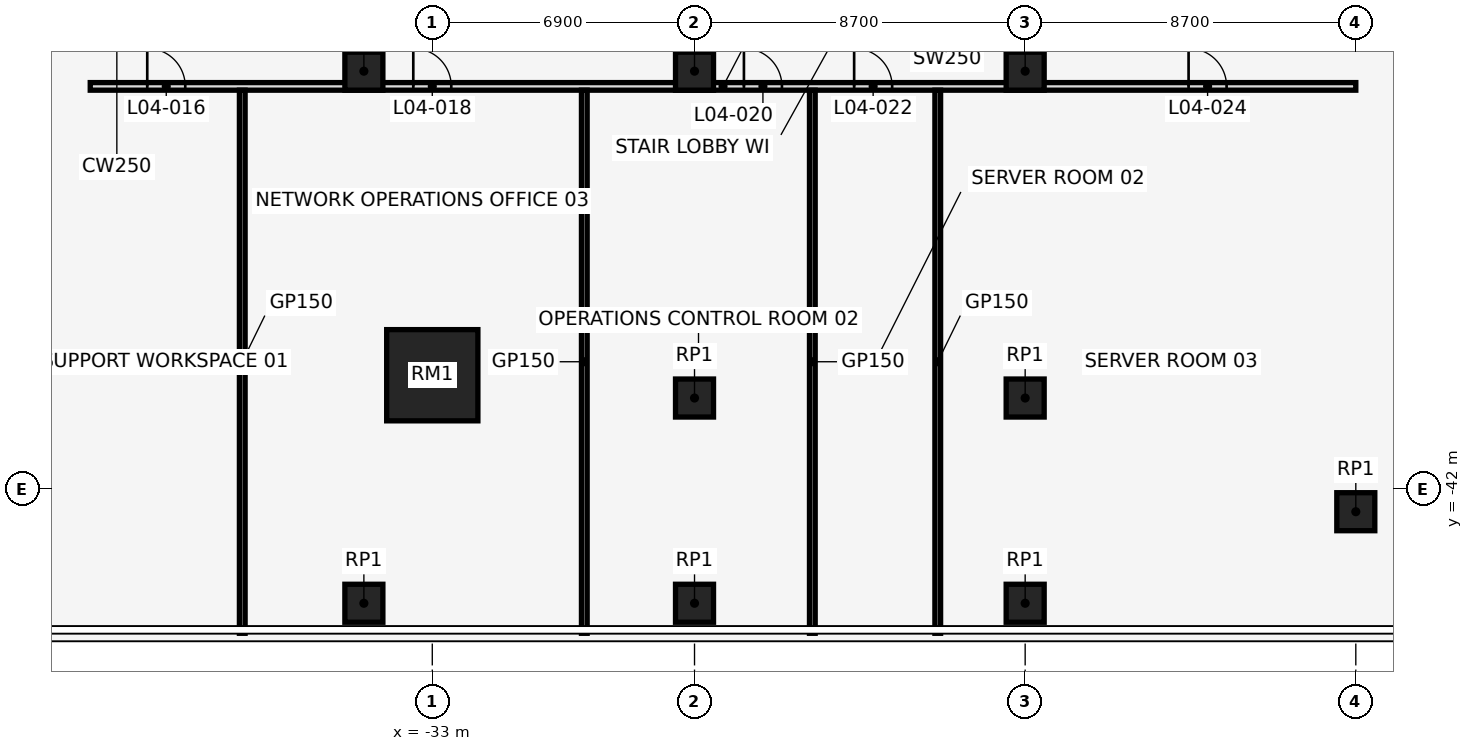
"""IFC4 building model, lengths in metres.
Left out: names, types, materials, properties, quantities, classifications, styles, units other than length and angle.
Written with IfcOpenShell. Run it as: python <this file> out.ifc"""

import sys

from ifc_helpers import new_model, si_unit, direction, frame, frame_2d, origin, origin_2d, place, context, subcontext, project, spatial, rectangle, extrude, element, fill, save


model = new_model("IFC4")
c1 = context("Model", 3, precision=1e-05, world=origin(), true_north=direction((0.0, 1.0)))
c2 = subcontext(c1, "Body", "Model", "MODEL_VIEW")
j1 = project(units=[si_unit("LENGTHUNIT", "METRE"), si_unit("PLANEANGLEUNIT", "RADIAN")], contexts=[c1])
p1 = place(None, origin())
s1 = spatial("IfcSite", under=j1, at=p1, CompositionType="ELEMENT")
p2 = place(p1, origin())
s2 = spatial("IfcBuilding", under=s1, at=p2, CompositionType="ELEMENT")
p3 = place(p2, frame((0.0, 0.0, 25.0)))
s3 = spatial("IfcBuildingStorey", under=s2, at=p3, CompositionType="ELEMENT", Elevation=25.0)
p4 = place(p3, frame((-33.0, -39.0, 0.0), z_axis=(0.0, 0.0, 1.0), x_axis=(1.0, 0.0, 0.0)))
e1 = element("IfcColumn", 1, at=p4, inside=s3, PredefinedType="COLUMN", context=c2, shape_type="SweptSolid", body=[
    extrude(rectangle(XDim=2.4, YDim=2.4, at=origin_2d()), origin(), (0.0, 0.0, 1.0), 5.0),
])
for number, where, z_axis, x_axis in (
    (2, (-26.1, -39.6, 0.0), (0.0, 0.0, 1.0), (1.0, 0.0, 0.0)),
    (3, (-17.4, -39.6, 0.0), (0.0, 0.0, 1.0), (1.0, 0.0, 0.0)),
):
    element("IfcColumn", number, at=place(p3, frame(where, z_axis=z_axis, x_axis=x_axis)), inside=s3, PredefinedType="COLUMN", context=c2, shape_type="SweptSolid", body=[
        extrude(rectangle(XDim=1.0, YDim=1.0, at=origin_2d()), origin(), (0.0, 0.0, 1.0), 5.0),
    ])
p5 = place(p3, frame((-8.7, -42.591, -0.3), z_axis=(0.0, 0.0, 1.0), x_axis=(1.0, 0.0, 0.0)))
e4 = element("IfcColumn", 4, at=p5, inside=s3, PredefinedType="COLUMN", context=c2, shape_type="SweptSolid", body=[
    extrude(rectangle(XDim=1.0, YDim=1.0, at=origin_2d()), origin(), (0.0, 0.0, 1.0), 5.3),
])
for number, where, z_axis, x_axis in (
    (5, (-34.8, -31.0, 0.0), (0.0, 0.0, 1.0), (1.0, 0.0, 0.0)),
    (6, (-34.8, -45.0, 0.0), (0.0, 0.0, 1.0), (1.0, 0.0, 0.0)),
    (7, (-26.1, -31.0, 0.0), (0.0, 0.0, 1.0), (1.0, 0.0, 0.0)),
    (8, (-26.1, -45.0, 0.0), (0.0, 0.0, 1.0), (1.0, 0.0, 0.0)),
    (9, (-17.4, -31.0, 0.0), (0.0, 0.0, 1.0), (1.0, 0.0, 0.0)),
    (10, (-17.4, -45.0, 0.0), (0.0, 0.0, 1.0), (1.0, 0.0, 0.0)),
):
    element("IfcColumn", number, at=place(p3, frame(where, z_axis=z_axis, x_axis=x_axis)), inside=s3, PredefinedType="COLUMN", context=c2, shape_type="SweptSolid", body=[
        extrude(rectangle(XDim=1.0, YDim=1.0, at=origin_2d()), origin(), (0.0, 0.0, 1.0), 5.0),
    ])
p6 = place(p3, frame((-42.0, -31.4, 0.0), z_axis=(0.0, 0.0, 1.0), x_axis=(1.0, 0.0, 0.0)))
e11 = element("IfcWall", 11, at=p6, inside=s3, PredefinedType="PARTITIONING", context=c2, shape_type="SweptSolid", body=[
    extrude(rectangle(XDim=33.3, YDim=0.2, at=frame_2d((16.65, 0.0))), origin(), (0.0, 0.0, 1.0), 4.7),
])
p7 = place(p6, frame((1.5, 0.0, 0.0)))
e12 = element("IfcOpeningElement", 12, at=p7, cuts=e11, PredefinedType="OPENING", context=c2, shape_type="SweptSolid", body=[
    extrude(rectangle(XDim=1.0, YDim=2.1, at=frame_2d((0.5, 1.05))), frame((0.0, 0.112, 0.0), z_axis=(0.0, -1.0, 0.0), x_axis=(1.0, 0.0, 0.0)), (0.0, 0.0, 1.0), 0.224),
])
p8 = place(p6, frame((8.5, 0.0, 0.0)))
e13 = element("IfcOpeningElement", 13, at=p8, cuts=e11, PredefinedType="OPENING", context=c2, shape_type="SweptSolid", body=[
    extrude(rectangle(XDim=1.0, YDim=2.1, at=frame_2d((0.5, 1.05))), frame((0.0, 0.112, 0.0), z_axis=(0.0, -1.0, 0.0), x_axis=(1.0, 0.0, 0.0)), (0.0, 0.0, 1.0), 0.224),
])
p9 = place(p6, frame((17.2, 0.0, 0.0)))
e14 = element("IfcOpeningElement", 14, at=p9, cuts=e11, PredefinedType="OPENING", context=c2, shape_type="SweptSolid", body=[
    extrude(rectangle(XDim=1.0, YDim=2.1, at=frame_2d((0.5, 1.05))), frame((0.0, 0.112, 0.0), z_axis=(0.0, -1.0, 0.0), x_axis=(1.0, 0.0, 0.0)), (0.0, 0.0, 1.0), 0.224),
])
p10 = place(p6, frame((20.1, 0.0, 0.0)))
e15 = element("IfcOpeningElement", 15, at=p10, cuts=e11, PredefinedType="OPENING", context=c2, shape_type="SweptSolid", body=[
    extrude(rectangle(XDim=1.0, YDim=2.1, at=frame_2d((0.5, 1.05))), frame((0.0, 0.112, 0.0), z_axis=(0.0, -1.0, 0.0), x_axis=(1.0, 0.0, 0.0)), (0.0, 0.0, 1.0), 0.224),
])
p11 = place(p6, frame((28.9, 0.0, 0.0)))
e16 = element("IfcOpeningElement", 16, at=p11, cuts=e11, PredefinedType="OPENING", context=c2, shape_type="SweptSolid", body=[
    extrude(rectangle(XDim=1.0, YDim=2.1, at=frame_2d((0.5, 1.05))), frame((0.0, 0.112, 0.0), z_axis=(0.0, -1.0, 0.0), x_axis=(1.0, 0.0, 0.0)), (0.0, 0.0, 1.0), 0.224),
])
for number, where, z_axis, x_axis in (
    (17, (-38.0, -45.79, 0.0), (0.0, 0.0, 1.0), (0.0, 1.0, 0.0)),
    (18, (-29.0, -45.79, 0.0), (0.0, 0.0, 1.0), (0.0, 1.0, 0.0)),
    (19, (-23.0, -45.79, 0.0), (0.0, 0.0, 1.0), (0.0, 1.0, 0.0)),
    (20, (-19.7, -45.79, 0.0), (0.0, 0.0, 1.0), (0.0, 1.0, 0.0)),
):
    element("IfcWall", number, at=place(p3, frame(where, z_axis=z_axis, x_axis=x_axis)), inside=s3, PredefinedType="PARTITIONING", context=c2, shape_type="SweptSolid", body=[
        extrude(rectangle(XDim=14.29, YDim=0.15, at=frame_2d((7.145, 0.0))), origin(), (0.0, 0.0, 1.0), 4.7),
    ])
p12 = place(p7, frame((1.0, 0.0, 0.0), z_axis=(0.0, 0.0, 1.0), x_axis=(-1.0, 0.0, 0.0)))
e21 = element("IfcDoor", 21, at=p12, inside=s3, OperationType="SINGLE_SWING_LEFT", PredefinedType="DOOR", context=c2, shape_type="SweptSolid", body=[
    extrude(rectangle(XDim=1.0, YDim=2.1, at=frame_2d((0.5, 1.05))), frame((0.0, 0.025, 0.0), z_axis=(0.0, -1.0, 0.0), x_axis=(1.0, 0.0, 0.0)), (0.0, 0.0, 1.0), 0.05),
])
fill(e12, e21)
p13 = place(p8, frame((1.0, 0.0, 0.0), z_axis=(0.0, 0.0, 1.0), x_axis=(-1.0, 0.0, 0.0)))
e22 = element("IfcDoor", 22, at=p13, inside=s3, OperationType="SINGLE_SWING_RIGHT", PredefinedType="DOOR", context=c2, shape_type="SweptSolid", body=[
    extrude(rectangle(XDim=1.0, YDim=2.1, at=frame_2d((0.5, 1.05))), frame((0.0, 0.025, 0.0), z_axis=(0.0, -1.0, 0.0), x_axis=(1.0, 0.0, 0.0)), (0.0, 0.0, 1.0), 0.05),
])
fill(e13, e22)
p14 = place(p9, frame((1.0, 0.0, 0.0), z_axis=(0.0, 0.0, 1.0), x_axis=(-1.0, 0.0, 0.0)))
e23 = element("IfcDoor", 23, at=p14, inside=s3, OperationType="SINGLE_SWING_RIGHT", PredefinedType="DOOR", context=c2, shape_type="SweptSolid", body=[
    extrude(rectangle(XDim=1.0, YDim=2.1, at=frame_2d((0.5, 1.05))), frame((0.0, 0.025, 0.0), z_axis=(0.0, -1.0, 0.0), x_axis=(1.0, 0.0, 0.0)), (0.0, 0.0, 1.0), 0.05),
])
fill(e14, e23)
p15 = place(p10, frame((1.0, 0.0, 0.0), z_axis=(0.0, 0.0, 1.0), x_axis=(-1.0, 0.0, 0.0)))
e24 = element("IfcDoor", 24, at=p15, inside=s3, OperationType="SINGLE_SWING_LEFT", PredefinedType="DOOR", context=c2, shape_type="SweptSolid", body=[
    extrude(rectangle(XDim=1.0, YDim=2.1, at=frame_2d((0.5, 1.05))), frame((0.0, 0.025, 0.0), z_axis=(0.0, -1.0, 0.0), x_axis=(1.0, 0.0, 0.0)), (0.0, 0.0, 1.0), 0.05),
])
fill(e15, e24)
p16 = place(p11, frame((1.0, 0.0, 0.0), z_axis=(0.0, 0.0, 1.0), x_axis=(-1.0, 0.0, 0.0)))
e25 = element("IfcDoor", 25, at=p16, inside=s3, OperationType="SINGLE_SWING_RIGHT", PredefinedType="DOOR", context=c2, shape_type="SweptSolid", body=[
    extrude(rectangle(XDim=1.0, YDim=2.1, at=frame_2d((0.5, 1.05))), frame((0.0, 0.025, 0.0), z_axis=(0.0, -1.0, 0.0), x_axis=(1.0, 0.0, 0.0)), (0.0, 0.0, 1.0), 0.05),
])
fill(e16, e25)
save(model, sys.argv[1])
